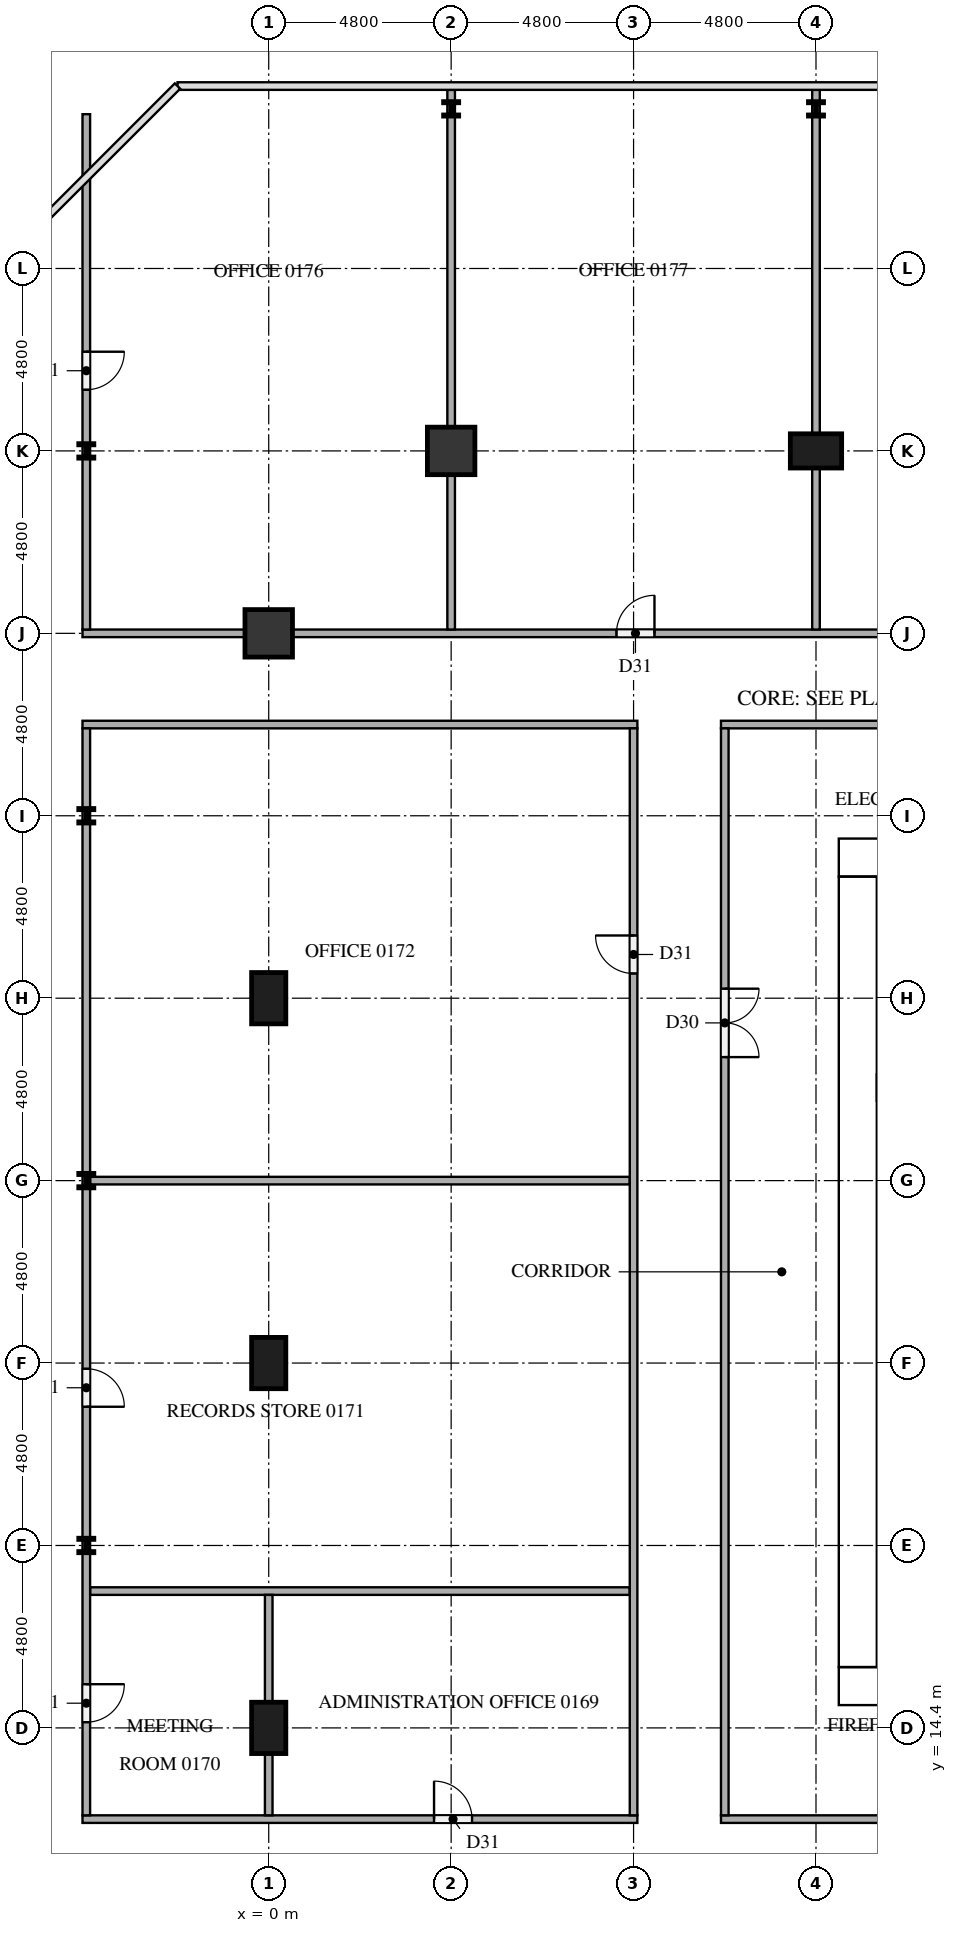
"""IFC4 building model, lengths in metres.
Left out: names, types, materials, properties, quantities, classifications, styles, units other than length and angle.
Written with IfcOpenShell. Run it as: python <this file> out.ifc"""

import sys

from ifc_helpers import new_model, si_unit, direction, frame, frame_2d, origin, origin_2d, place, context, subcontext, project, spatial, rectangle, i_section, extrude, element, fill, save


model = new_model("IFC4")
c1 = context("Model", 3, precision=1e-05, world=origin(), true_north=direction((0.0, 1.0)))
c2 = subcontext(c1, "Body", "Model", "MODEL_VIEW")
j1 = project(units=[si_unit("LENGTHUNIT", "METRE"), si_unit("PLANEANGLEUNIT", "RADIAN")], contexts=[c1])
p1 = place(None, origin())
s1 = spatial("IfcSite", under=j1, at=p1, CompositionType="ELEMENT")
p2 = place(p1, origin())
s2 = spatial("IfcBuilding", under=s1, at=p2, CompositionType="ELEMENT")
p3 = place(p2, frame((0.0, 0.0, 6.0)))
s3 = spatial("IfcBuildingStorey", under=s2, at=p3, CompositionType="ELEMENT", Elevation=6.0)
p4 = place(p3, frame((15.0, 15.5, 0.0), z_axis=(0.0, 0.0, 1.0), x_axis=(1.0, 0.0, 0.0)))
e1 = element("IfcWall", 1, at=p4, inside=s3, PredefinedType="SHEAR", context=c2, shape_type="SweptSolid", body=[
    extrude(rectangle(XDim=32.4, YDim=1.0, at=frame_2d((16.2, 0.0))), origin(), (0.0, 0.0, 1.0), 4.2),
])
p5 = place(p4, frame((15.3, 0.0, 0.0)))
e2 = element("IfcOpeningElement", 2, at=p5, cuts=e1, PredefinedType="OPENING", context=c2, shape_type="SweptSolid", body=[
    extrude(rectangle(XDim=1.8, YDim=2.1, at=frame_2d((0.9, 1.05))), frame((0.0, 0.51, 0.0), z_axis=(0.0, -1.0, 0.0), x_axis=(1.0, 0.0, 0.0)), (0.0, 0.0, 1.0), 1.02),
])
p6 = place(p3, frame((15.0, 37.3, 0.0), z_axis=(0.0, 0.0, 1.0), x_axis=(1.0, 0.0, 0.0)))
e3 = element("IfcWall", 3, at=p6, inside=s3, PredefinedType="SHEAR", context=c2, shape_type="SweptSolid", body=[
    extrude(rectangle(XDim=32.4, YDim=1.0, at=frame_2d((16.2, 0.0))), origin(), (0.0, 0.0, 1.0), 4.2),
])
p7 = place(p6, frame((15.3, 0.0, 0.0)))
e4 = element("IfcOpeningElement", 4, at=p7, cuts=e3, PredefinedType="OPENING", context=c2, shape_type="SweptSolid", body=[
    extrude(rectangle(XDim=1.8, YDim=2.1, at=frame_2d((0.9, 1.05))), frame((0.0, 0.51, 0.0), z_axis=(0.0, -1.0, 0.0), x_axis=(1.0, 0.0, 0.0)), (0.0, 0.0, 1.0), 1.02),
])
p8 = place(p6, frame((1.766, 0.0, 0.0)))
e5 = element("IfcOpeningElement", 5, at=p8, cuts=e3, PredefinedType="OPENING", context=c2, shape_type="SweptSolid", body=[
    extrude(rectangle(XDim=1.0, YDim=2.1, at=frame_2d((0.5, 1.05))), frame((0.0, 0.51, 0.0), z_axis=(0.0, -1.0, 0.0), x_axis=(1.0, 0.0, 0.0)), (0.0, 0.0, 1.0), 1.02),
])
p9 = place(p6, frame((5.241, 0.0, 0.0)))
e6 = element("IfcOpeningElement", 6, at=p9, cuts=e3, PredefinedType="OPENING", context=c2, shape_type="SweptSolid", body=[
    extrude(rectangle(XDim=1.0, YDim=2.1, at=frame_2d((0.5, 1.05))), frame((0.0, 0.51, 0.0), z_axis=(0.0, -1.0, 0.0), x_axis=(1.0, 0.0, 0.0)), (0.0, 0.0, 1.0), 1.02),
])
p10 = place(p3, frame((15.5, 16.0, 0.0), z_axis=(0.0, 0.0, 1.0), x_axis=(0.0, 1.0, 0.0)))
e7 = element("IfcWall", 7, at=p10, inside=s3, PredefinedType="SHEAR", context=c2, shape_type="SweptSolid", body=[
    extrude(rectangle(XDim=20.8, YDim=1.0, at=frame_2d((10.4, 0.0))), origin(), (0.0, 0.0, 1.0), 4.2),
])
p11 = place(p10, frame((4.76, 0.0, 0.0)))
e8 = element("IfcOpeningElement", 8, at=p11, cuts=e7, PredefinedType="OPENING", context=c2, shape_type="SweptSolid", body=[
    extrude(rectangle(XDim=1.2, YDim=2.1, at=frame_2d((0.6, 1.05))), frame((0.0, 0.51, 0.0), z_axis=(0.0, -1.0, 0.0), x_axis=(1.0, 0.0, 0.0)), (0.0, 0.0, 1.0), 1.02),
])
p12 = place(p3, frame((14.4, 48.0, 0.0), z_axis=(0.0, 0.0, 1.0), x_axis=(1.0, 0.0, 0.0)))
e9 = element("IfcColumn", 9, at=p12, inside=s3, PredefinedType="COLUMN", context=c2, shape_type="SweptSolid", body=[
    extrude(rectangle(XDim=1.35, YDim=0.9, at=origin_2d()), origin(), (0.0, 0.0, 1.0), 4.2),
])
for number, where, z_axis, x_axis in (
    (10, (4.8, 48.0, 0.0), (0.0, 0.0, 1.0), (1.0, 0.0, 0.0)),
    (11, (0.0, 43.2, 0.0), (0.0, 0.0, 1.0), (1.0, 0.0, 0.0)),
):
    element("IfcColumn", number, at=place(p3, frame(where, z_axis=z_axis, x_axis=x_axis)), inside=s3, PredefinedType="COLUMN", context=c2, shape_type="SweptSolid", body=[
        extrude(rectangle(XDim=1.25, YDim=1.25, at=origin_2d()), origin(), (0.0, 0.0, 1.0), 4.2),
    ])
for number, where, z_axis, x_axis in (
    (12, (0.0, 33.6, 0.0), (0.0, 0.0, 1.0), (0.0, 1.0, 0.0)),
    (13, (0.0, 24.0, 0.0), (0.0, 0.0, 1.0), (0.0, 1.0, 0.0)),
    (14, (0.0, 14.4, 0.0), (0.0, 0.0, 1.0), (0.0, 1.0, 0.0)),
):
    element("IfcColumn", number, at=place(p3, frame(where, z_axis=z_axis, x_axis=x_axis)), inside=s3, PredefinedType="COLUMN", context=c2, shape_type="SweptSolid", body=[
        extrude(rectangle(XDim=1.35, YDim=0.9, at=origin_2d()), origin(), (0.0, 0.0, 1.0), 4.2),
    ])
for number, where, z_axis, x_axis in (
    (15, (-4.8, 19.2, 0.0), (0.0, 0.0, 1.0), (1.0, 0.0, 0.0)),
    (16, (-4.8, 28.8, 0.0), (0.0, 0.0, 1.0), (1.0, 0.0, 0.0)),
    (17, (-4.8, 38.4, 0.0), (0.0, 0.0, 1.0), (1.0, 0.0, 0.0)),
    (18, (-4.8, 48.0, 0.0), (0.0, 0.0, 1.0), (1.0, 0.0, 0.0)),
    (19, (4.8, 57.0, 0.0), (0.0, 0.0, 1.0), (1.0, 0.0, 0.0)),
    (20, (14.4, 57.0, 0.0), (0.0, 0.0, 1.0), (1.0, 0.0, 0.0)),
):
    element("IfcColumn", number, at=place(p3, frame(where, z_axis=z_axis, x_axis=x_axis)), inside=s3, PredefinedType="COLUMN", context=c2, shape_type="SweptSolid", body=[
        extrude(i_section(OverallWidth=0.396, OverallDepth=0.381, WebThickness=0.019, FlangeThickness=0.03, at=origin_2d()), origin(), (0.0, 0.0, 1.0), 4.2),
    ])
p13 = place(p3, frame((-4.9, 12.0, 0.0), z_axis=(0.0, 0.0, 1.0), x_axis=(1.0, 0.0, 0.0)))
e21 = element("IfcWall", 21, at=p13, inside=s3, PredefinedType="PARTITIONING", context=c2, shape_type="SweptSolid", body=[
    extrude(rectangle(XDim=14.6, YDim=0.2, at=frame_2d((7.3, 0.0))), origin(), (0.0, 0.0, 1.0), 4.2),
])
p14 = place(p13, frame((9.25, 0.0, 0.0)))
e22 = element("IfcOpeningElement", 22, at=p14, cuts=e21, PredefinedType="OPENING", context=c2, shape_type="SweptSolid", body=[
    extrude(rectangle(XDim=1.0, YDim=2.1, at=frame_2d((0.5, 1.05))), frame((0.0, 0.11, 0.0), z_axis=(0.0, -1.0, 0.0), x_axis=(1.0, 0.0, 0.0)), (0.0, 0.0, 1.0), 0.22),
])
p15 = place(p3, frame((11.9, 12.0, 0.0), z_axis=(0.0, 0.0, 1.0), x_axis=(1.0, 0.0, 0.0)))
e23 = element("IfcWall", 23, at=p15, inside=s3, PredefinedType="PARTITIONING", context=c2, shape_type="SweptSolid", body=[
    extrude(rectangle(XDim=38.6, YDim=0.2, at=frame_2d((19.3, 0.0))), origin(), (0.0, 0.0, 1.0), 4.2),
])
p16 = place(p15, frame((18.45, 0.0, 0.0)))
e24 = element("IfcOpeningElement", 24, at=p16, cuts=e23, PredefinedType="OPENING", context=c2, shape_type="SweptSolid", body=[
    extrude(rectangle(XDim=1.8, YDim=2.1, at=frame_2d((0.9, 1.05))), frame((0.0, 0.11, 0.0), z_axis=(0.0, -1.0, 0.0), x_axis=(1.0, 0.0, 0.0)), (0.0, 0.0, 1.0), 0.22),
])
for number, where, z_axis, x_axis in (
    (25, (-4.7, 18.0, 0.0), (0.0, 0.0, 1.0), (1.0, 0.0, 0.0)),
    (26, (-4.7, 28.8, 0.0), (0.0, 0.0, 1.0), (1.0, 0.0, 0.0)),
):
    element("IfcWall", number, at=place(p3, frame(where, z_axis=z_axis, x_axis=x_axis)), inside=s3, PredefinedType="PARTITIONING", context=c2, shape_type="SweptSolid", body=[
        extrude(rectangle(XDim=14.2, YDim=0.2, at=frame_2d((7.1, 0.0))), origin(), (0.0, 0.0, 1.0), 4.2),
    ])
p17 = place(p3, frame((-4.9, 40.8, 0.0), z_axis=(0.0, 0.0, 1.0), x_axis=(1.0, 0.0, 0.0)))
e27 = element("IfcWall", 27, at=p17, inside=s3, PredefinedType="PARTITIONING", context=c2, shape_type="SweptSolid", body=[
    extrude(rectangle(XDim=14.6, YDim=0.2, at=frame_2d((7.3, 0.0))), origin(), (0.0, 0.0, 1.0), 4.2),
])
p18 = place(p3, frame((50.5, 40.8, 0.0), z_axis=(0.0, 0.0, 1.0), x_axis=(-1.0, 0.0, 0.0)))
e28 = element("IfcWall", 28, at=p18, inside=s3, PredefinedType="PARTITIONING", context=c2, shape_type="SweptSolid", body=[
    extrude(rectangle(XDim=38.6, YDim=0.2, at=frame_2d((19.3, 0.0))), origin(), (0.0, 0.0, 1.0), 4.2),
])
p19 = place(p18, frame((18.45, 0.0, 0.0)))
e29 = element("IfcOpeningElement", 29, at=p19, cuts=e28, PredefinedType="OPENING", context=c2, shape_type="SweptSolid", body=[
    extrude(rectangle(XDim=1.8, YDim=2.1, at=frame_2d((0.9, 1.05))), frame((0.0, 0.11, 0.0), z_axis=(0.0, -1.0, 0.0), x_axis=(1.0, 0.0, 0.0)), (0.0, 0.0, 1.0), 0.22),
])
p20 = place(p18, frame((16.25, 0.0, 0.0)))
e30 = element("IfcOpeningElement", 30, at=p20, cuts=e28, PredefinedType="OPENING", context=c2, shape_type="SweptSolid", body=[
    extrude(rectangle(XDim=1.8, YDim=2.1, at=frame_2d((0.9, 1.05))), frame((0.0, 0.11, 0.0), z_axis=(0.0, -1.0, 0.0), x_axis=(1.0, 0.0, 0.0)), (0.0, 0.0, 1.0), 0.22),
])
p21 = place(p3, frame((-4.9, 43.2, 0.0), z_axis=(0.0, 0.0, 1.0), x_axis=(1.0, 0.0, 0.0)))
e31 = element("IfcWall", 31, at=p21, inside=s3, PredefinedType="PARTITIONING", context=c2, shape_type="SweptSolid", body=[
    extrude(rectangle(XDim=45.35, YDim=0.2, at=frame_2d((22.675, 0.0))), origin(), (0.0, 0.0, 1.0), 4.2),
])
p22 = place(p21, frame((14.05, 0.0, 0.0)))
e32 = element("IfcOpeningElement", 32, at=p22, cuts=e31, PredefinedType="OPENING", context=c2, shape_type="SweptSolid", body=[
    extrude(rectangle(XDim=1.0, YDim=2.1, at=frame_2d((0.5, 1.05))), frame((0.0, 0.11, 0.0), z_axis=(0.0, -1.0, 0.0), x_axis=(1.0, 0.0, 0.0)), (0.0, 0.0, 1.0), 0.22),
])
p23 = place(p21, frame((23.55, 0.0, 0.0)))
e33 = element("IfcOpeningElement", 33, at=p23, cuts=e31, PredefinedType="OPENING", context=c2, shape_type="SweptSolid", body=[
    extrude(rectangle(XDim=1.0, YDim=2.1, at=frame_2d((0.5, 1.05))), frame((0.0, 0.11, 0.0), z_axis=(0.0, -1.0, 0.0), x_axis=(1.0, 0.0, 0.0)), (0.0, 0.0, 1.0), 0.22),
])
p24 = place(p21, frame((33.25, 0.0, 0.0)))
e34 = element("IfcOpeningElement", 34, at=p24, cuts=e31, PredefinedType="OPENING", context=c2, shape_type="SweptSolid", body=[
    extrude(rectangle(XDim=1.0, YDim=2.1, at=frame_2d((0.5, 1.05))), frame((0.0, 0.11, 0.0), z_axis=(0.0, -1.0, 0.0), x_axis=(1.0, 0.0, 0.0)), (0.0, 0.0, 1.0), 0.22),
])
p25 = place(p3, frame((-4.8, 40.7, 0.0), z_axis=(0.0, 0.0, 1.0), x_axis=(0.0, -1.0, 0.0)))
e35 = element("IfcWall", 35, at=p25, inside=s3, PredefinedType="PARTITIONING", context=c2, shape_type="SweptSolid", body=[
    extrude(rectangle(XDim=28.6, YDim=0.2, at=frame_2d((14.3, 0.0))), origin(), (0.0, 0.0, 1.0), 4.2),
])
p26 = place(p25, frame((25.15, 0.0, 0.0)))
e36 = element("IfcOpeningElement", 36, at=p26, cuts=e35, PredefinedType="OPENING", context=c2, shape_type="SweptSolid", body=[
    extrude(rectangle(XDim=1.0, YDim=2.1, at=frame_2d((0.5, 1.05))), frame((0.0, 0.11, 0.0), z_axis=(0.0, -1.0, 0.0), x_axis=(1.0, 0.0, 0.0)), (0.0, 0.0, 1.0), 0.22),
])
p27 = place(p25, frame((16.85, 0.0, 0.0)))
e37 = element("IfcOpeningElement", 37, at=p27, cuts=e35, PredefinedType="OPENING", context=c2, shape_type="SweptSolid", body=[
    extrude(rectangle(XDim=1.0, YDim=2.1, at=frame_2d((0.5, 1.05))), frame((0.0, 0.11, 0.0), z_axis=(0.0, -1.0, 0.0), x_axis=(1.0, 0.0, 0.0)), (0.0, 0.0, 1.0), 0.22),
])
p28 = place(p3, frame((-4.8, 56.86, 0.0), z_axis=(0.0, 0.0, 1.0), x_axis=(0.0, -1.0, 0.0)))
e38 = element("IfcWall", 38, at=p28, inside=s3, PredefinedType="PARTITIONING", context=c2, shape_type="SweptSolid", body=[
    extrude(rectangle(XDim=13.56, YDim=0.2, at=frame_2d((6.78, 0.0))), origin(), (0.0, 0.0, 1.0), 4.2),
])
p29 = place(p28, frame((6.25, 0.0, 0.0)))
e39 = element("IfcOpeningElement", 39, at=p29, cuts=e38, PredefinedType="OPENING", context=c2, shape_type="SweptSolid", body=[
    extrude(rectangle(XDim=1.0, YDim=2.1, at=frame_2d((0.5, 1.05))), frame((0.0, 0.11, 0.0), z_axis=(0.0, -1.0, 0.0), x_axis=(1.0, 0.0, 0.0)), (0.0, 0.0, 1.0), 0.22),
])
p30 = place(p3, frame((0.0, 12.1, 0.0), z_axis=(0.0, 0.0, 1.0), x_axis=(0.0, 1.0, 0.0)))
e40 = element("IfcWall", 40, at=p30, inside=s3, PredefinedType="PARTITIONING", context=c2, shape_type="SweptSolid", body=[
    extrude(rectangle(XDim=5.8, YDim=0.2, at=frame_2d((2.9, 0.0))), origin(), (0.0, 0.0, 1.0), 4.2),
])
p31 = place(p3, frame((4.8, 43.3, 0.0), z_axis=(0.0, 0.0, 1.0), x_axis=(0.0, 1.0, 0.0)))
e41 = element("IfcWall", 41, at=p31, inside=s3, PredefinedType="PARTITIONING", context=c2, shape_type="SweptSolid", body=[
    extrude(rectangle(XDim=14.2, YDim=0.2, at=frame_2d((7.1, 0.0))), origin(), (0.0, 0.0, 1.0), 4.2),
])
p32 = place(p3, frame((9.6, 12.1, 0.0), z_axis=(0.0, 0.0, 1.0), x_axis=(0.0, 1.0, 0.0)))
e42 = element("IfcWall", 42, at=p32, inside=s3, PredefinedType="PARTITIONING", context=c2, shape_type="SweptSolid", body=[
    extrude(rectangle(XDim=28.6, YDim=0.2, at=frame_2d((14.3, 0.0))), origin(), (0.0, 0.0, 1.0), 4.2),
])
p33 = place(p32, frame((22.15, 0.0, 0.0)))
e43 = element("IfcOpeningElement", 43, at=p33, cuts=e42, PredefinedType="OPENING", context=c2, shape_type="SweptSolid", body=[
    extrude(rectangle(XDim=1.0, YDim=2.1, at=frame_2d((0.5, 1.05))), frame((0.0, 0.11, 0.0), z_axis=(0.0, -1.0, 0.0), x_axis=(1.0, 0.0, 0.0)), (0.0, 0.0, 1.0), 0.22),
])
p34 = place(p3, frame((12.0, 40.7, 0.0), z_axis=(0.0, 0.0, 1.0), x_axis=(0.0, -1.0, 0.0)))
e44 = element("IfcWall", 44, at=p34, inside=s3, PredefinedType="PARTITIONING", context=c2, shape_type="SweptSolid", body=[
    extrude(rectangle(XDim=28.6, YDim=0.2, at=frame_2d((14.3, 0.0))), origin(), (0.0, 0.0, 1.0), 4.2),
])
p35 = place(p34, frame((6.85, 0.0, 0.0)))
e45 = element("IfcOpeningElement", 45, at=p35, cuts=e44, PredefinedType="OPENING", context=c2, shape_type="SweptSolid", body=[
    extrude(rectangle(XDim=1.8, YDim=2.1, at=frame_2d((0.9, 1.05))), frame((0.0, 0.11, 0.0), z_axis=(0.0, -1.0, 0.0), x_axis=(1.0, 0.0, 0.0)), (0.0, 0.0, 1.0), 0.22),
])
p36 = place(p3, frame((14.4, 43.3, 0.0), z_axis=(0.0, 0.0, 1.0), x_axis=(0.0, 1.0, 0.0)))
e46 = element("IfcWall", 46, at=p36, inside=s3, PredefinedType="PARTITIONING", context=c2, shape_type="SweptSolid", body=[
    extrude(rectangle(XDim=14.2, YDim=0.2, at=frame_2d((7.1, 0.0))), origin(), (0.0, 0.0, 1.0), 4.2),
])
p37 = place(p11, frame((1.2, 0.0, 0.0), z_axis=(0.0, 0.0, 1.0), x_axis=(-1.0, 0.0, 0.0)))
e47 = element("IfcDoor", 47, at=p37, inside=s3, OperationType="SINGLE_SWING_RIGHT", PredefinedType="DOOR", context=c2, shape_type="SweptSolid", body=[
    extrude(rectangle(XDim=1.2, YDim=2.1, at=frame_2d((0.6, 1.05))), frame((0.0, 0.025, 0.0), z_axis=(0.0, -1.0, 0.0), x_axis=(1.0, 0.0, 0.0)), (0.0, 0.0, 1.0), 0.05),
])
fill(e8, e47)
p38 = place(p14, origin())
e48 = element("IfcDoor", 48, at=p38, inside=s3, OperationType="SINGLE_SWING_LEFT", PredefinedType="DOOR", context=c2, shape_type="SweptSolid", body=[
    extrude(rectangle(XDim=1.0, YDim=2.1, at=frame_2d((0.5, 1.05))), frame((0.0, 0.025, 0.0), z_axis=(0.0, -1.0, 0.0), x_axis=(1.0, 0.0, 0.0)), (0.0, 0.0, 1.0), 0.05),
])
fill(e22, e48)
p39 = place(p26, origin())
e49 = element("IfcDoor", 49, at=p39, inside=s3, OperationType="SINGLE_SWING_LEFT", PredefinedType="DOOR", context=c2, shape_type="SweptSolid", body=[
    extrude(rectangle(XDim=1.0, YDim=2.1, at=frame_2d((0.5, 1.05))), frame((0.0, 0.025, 0.0), z_axis=(0.0, -1.0, 0.0), x_axis=(1.0, 0.0, 0.0)), (0.0, 0.0, 1.0), 0.05),
])
fill(e36, e49)
p40 = place(p27, origin())
e50 = element("IfcDoor", 50, at=p40, inside=s3, OperationType="SINGLE_SWING_RIGHT", PredefinedType="DOOR", context=c2, shape_type="SweptSolid", body=[
    extrude(rectangle(XDim=1.0, YDim=2.1, at=frame_2d((0.5, 1.05))), frame((0.0, 0.025, 0.0), z_axis=(0.0, -1.0, 0.0), x_axis=(1.0, 0.0, 0.0)), (0.0, 0.0, 1.0), 0.05),
])
fill(e37, e50)
p41 = place(p33, origin())
e51 = element("IfcDoor", 51, at=p41, inside=s3, OperationType="SINGLE_SWING_RIGHT", PredefinedType="DOOR", context=c2, shape_type="SweptSolid", body=[
    extrude(rectangle(XDim=1.0, YDim=2.1, at=frame_2d((0.5, 1.05))), frame((0.0, 0.025, 0.0), z_axis=(0.0, -1.0, 0.0), x_axis=(1.0, 0.0, 0.0)), (0.0, 0.0, 1.0), 0.05),
])
fill(e43, e51)
p42 = place(p29, origin())
e52 = element("IfcDoor", 52, at=p42, inside=s3, OperationType="SINGLE_SWING_LEFT", PredefinedType="DOOR", context=c2, shape_type="SweptSolid", body=[
    extrude(rectangle(XDim=1.0, YDim=2.1, at=frame_2d((0.5, 1.05))), frame((0.0, 0.025, 0.0), z_axis=(0.0, -1.0, 0.0), x_axis=(1.0, 0.0, 0.0)), (0.0, 0.0, 1.0), 0.05),
])
fill(e39, e52)
p43 = place(p22, origin())
e53 = element("IfcDoor", 53, at=p43, inside=s3, OperationType="SINGLE_SWING_RIGHT", PredefinedType="DOOR", context=c2, shape_type="SweptSolid", body=[
    extrude(rectangle(XDim=1.0, YDim=2.1, at=frame_2d((0.5, 1.05))), frame((0.0, 0.025, 0.0), z_axis=(0.0, -1.0, 0.0), x_axis=(1.0, 0.0, 0.0)), (0.0, 0.0, 1.0), 0.05),
])
fill(e32, e53)
p44 = place(p35, origin())
e54 = element("IfcDoor", 54, at=p44, inside=s3, OperationType="DOUBLE_DOOR_SINGLE_SWING", PredefinedType="DOOR", context=c2, shape_type="SweptSolid", body=[
    extrude(rectangle(XDim=1.8, YDim=2.1, at=frame_2d((0.9, 1.05))), frame((0.0, 0.025, 0.0), z_axis=(0.0, -1.0, 0.0), x_axis=(1.0, 0.0, 0.0)), (0.0, 0.0, 1.0), 0.05),
])
fill(e45, e54)
save(model, sys.argv[1])
